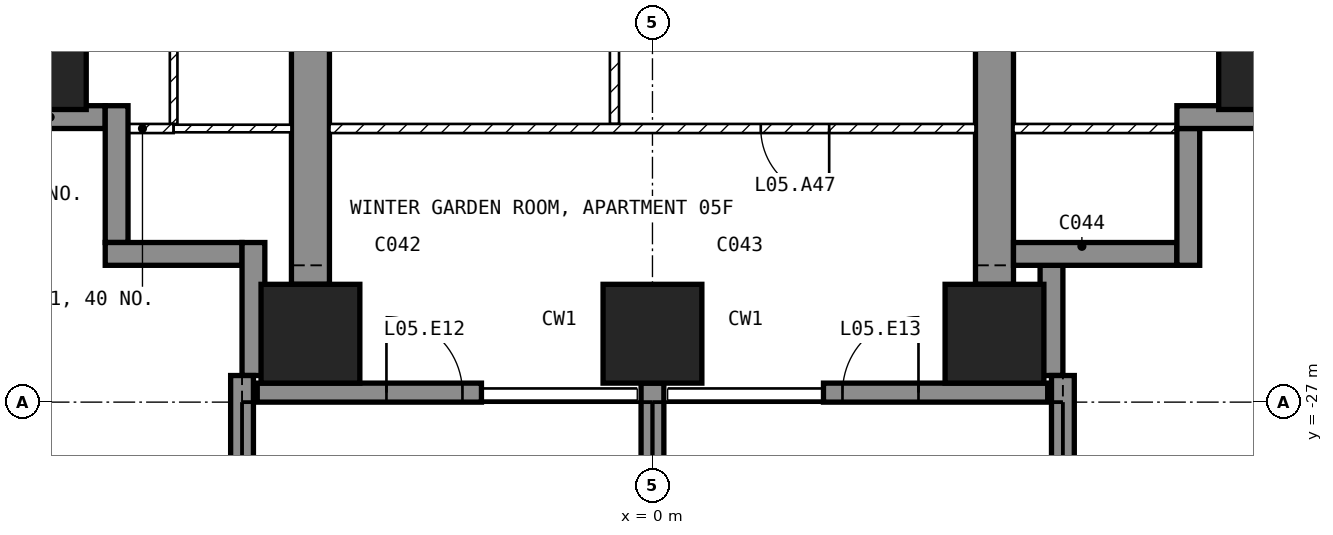
"""IFC4 building model, lengths in metres.
Left out: names, types, materials, properties, quantities, classifications, styles, units other than length and angle.
Written with IfcOpenShell. Run it as: python <this file> out.ifc"""

import sys

from ifc_helpers import new_model, si_unit, direction, frame, frame_2d, origin, origin_2d, place, context, subcontext, project, spatial, polyline, rectangle, outline, extrude, element, fill, save


model = new_model("IFC4")
c1 = context("Model", 3, precision=1e-05, world=origin(), true_north=direction((0.0, 1.0)))
c2 = subcontext(c1, "Body", "Model", "MODEL_VIEW")
j1 = project(units=[si_unit("LENGTHUNIT", "METRE"), si_unit("PLANEANGLEUNIT", "RADIAN")], contexts=[c1])
p1 = place(None, origin())
s1 = spatial("IfcSite", under=j1, at=p1, CompositionType="ELEMENT")
p2 = place(p1, origin())
s2 = spatial("IfcBuilding", under=s1, at=p2, CompositionType="ELEMENT")
p3 = place(p2, frame((0.0, 0.0, 36.5)))
s3 = spatial("IfcBuildingStorey", under=s2, at=p3, CompositionType="ELEMENT", Elevation=36.5)
for number, where, z_axis, x_axis in (
    (1, (-8.1, -22.5, -0.25), (0.0, 0.0, 1.0), (1.0, 0.0, 0.0)),
    (2, (-4.5, -26.1, -0.25), (0.0, 0.0, 1.0), (1.0, 0.0, 0.0)),
    (3, (0.0, -26.1, -0.25), (0.0, 0.0, 1.0), (1.0, 0.0, 0.0)),
    (4, (4.5, -26.1, -0.25), (0.0, 0.0, 1.0), (1.0, 0.0, 0.0)),
    (5, (8.1, -22.5, -0.25), (0.0, 0.0, 1.0), (1.0, 0.0, 0.0)),
):
    element("IfcColumn", number, at=place(p3, frame(where, z_axis=z_axis, x_axis=x_axis)), inside=s3, PredefinedType="COLUMN", context=c2, shape_type="SweptSolid", body=[
        extrude(rectangle(XDim=1.3, YDim=1.3, at=origin_2d()), origin(), (0.0, 0.0, 1.0), 3.5),
    ])
for number, where, z_axis, x_axis in (
    (6, (-4.75, -25.45, -0.25), (1.0, 0.0, 0.0), (0.0, 1.0, 0.0)),
    (7, (4.25, -25.45, -0.25), (1.0, 0.0, 0.0), (0.0, 1.0, 0.0)),
):
    element("IfcWall", number, at=place(p3, frame(where, z_axis=z_axis, x_axis=x_axis)), inside=s3, PredefinedType="SHEAR", context=c2, shape_type="SweptSolid", body=[
        extrude(outline(polyline([(0.0, 0.0), (4.15, 0.0), (4.15, 2.65), (6.55, 2.65), (6.55, 0.0), (11.95, 0.0), (11.95, 2.65), (14.35, 2.65), (14.35, 0.0), (16.45, 0.0), (16.45, 3.5), (0.0, 3.5), (0.0, 0.0)])), origin(), (0.0, 0.0, 1.0), 0.5),
    ])
p4 = place(p3, frame((-5.2, -26.875, 0.0), z_axis=(0.0, 0.0, 1.0), x_axis=(1.0, 0.0, 0.0)))
e8 = element("IfcWall", 8, at=p4, inside=s3, PredefinedType="SOLIDWALL", context=c2, shape_type="SweptSolid", body=[
    extrude(rectangle(XDim=2.95, YDim=0.25, at=frame_2d((1.475, 0.0))), origin(), (0.0, 0.0, 1.0), 3.25),
])
p5 = place(p4, frame((1.7, 0.0, 0.0)))
e9 = element("IfcOpeningElement", 9, at=p5, cuts=e8, PredefinedType="OPENING", context=c2, shape_type="SweptSolid", body=[
    extrude(rectangle(XDim=1.0, YDim=2.4, at=frame_2d((0.5, 1.2))), frame((0.0, 0.135, 0.0), z_axis=(0.0, -1.0, 0.0), x_axis=(1.0, 0.0, 0.0)), (0.0, 0.0, 1.0), 0.27),
])
p6 = place(p3, frame((2.25, -26.875, 0.0), z_axis=(0.0, 0.0, 1.0), x_axis=(1.0, 0.0, 0.0)))
e10 = element("IfcWall", 10, at=p6, inside=s3, PredefinedType="SOLIDWALL", context=c2, shape_type="SweptSolid", body=[
    extrude(rectangle(XDim=2.95, YDim=0.25, at=frame_2d((1.475, 0.0))), origin(), (0.0, 0.0, 1.0), 3.25),
])
p7 = place(p6, frame((0.25, 0.0, 0.0)))
e11 = element("IfcOpeningElement", 11, at=p7, cuts=e10, PredefinedType="OPENING", context=c2, shape_type="SweptSolid", body=[
    extrude(rectangle(XDim=1.0, YDim=2.4, at=frame_2d((0.5, 1.2))), frame((0.0, 0.135, 0.0), z_axis=(0.0, -1.0, 0.0), x_axis=(1.0, 0.0, 0.0)), (0.0, 0.0, 1.0), 0.27),
])
p8 = place(p3, frame((5.25, -26.65, 0.0), z_axis=(0.0, 0.0, 1.0), x_axis=(0.0, 1.0, 0.0)))
e12 = element("IfcWall", 12, at=p8, inside=s3, PredefinedType="SOLIDWALL", context=c2, shape_type="SweptSolid", body=[
    extrude(rectangle(XDim=1.45, YDim=0.3, at=frame_2d((0.725, 0.0))), origin(), (0.0, 0.0, 1.0), 3.25),
])
p9 = place(p3, frame((4.75, -25.05, 0.0), z_axis=(0.0, 0.0, 1.0), x_axis=(1.0, 0.0, 0.0)))
e13 = element("IfcWall", 13, at=p9, inside=s3, PredefinedType="SOLIDWALL", context=c2, shape_type="SweptSolid", body=[
    extrude(rectangle(XDim=2.15, YDim=0.3, at=frame_2d((1.075, 0.0))), origin(), (0.0, 0.0, 1.0), 3.25),
])
p10 = place(p3, frame((7.05, -25.2, 0.0), z_axis=(0.0, 0.0, 1.0), x_axis=(0.0, 1.0, 0.0)))
e14 = element("IfcWall", 14, at=p10, inside=s3, PredefinedType="SOLIDWALL", context=c2, shape_type="SweptSolid", body=[
    extrude(rectangle(XDim=1.8, YDim=0.3, at=frame_2d((0.9, 0.0))), origin(), (0.0, 0.0, 1.0), 3.25),
])
p11 = place(p3, frame((6.9, -23.25, 0.0), z_axis=(0.0, 0.0, 1.0), x_axis=(1.0, 0.0, 0.0)))
e15 = element("IfcWall", 15, at=p11, inside=s3, PredefinedType="SOLIDWALL", context=c2, shape_type="SweptSolid", body=[
    extrude(rectangle(XDim=1.75, YDim=0.3, at=frame_2d((0.875, 0.0))), origin(), (0.0, 0.0, 1.0), 3.25),
])
p12 = place(p3, frame((-8.65, -23.25, 0.0), z_axis=(0.0, 0.0, 1.0), x_axis=(1.0, 0.0, 0.0)))
e16 = element("IfcWall", 16, at=p12, inside=s3, PredefinedType="SOLIDWALL", context=c2, shape_type="SweptSolid", body=[
    extrude(rectangle(XDim=1.45, YDim=0.3, at=frame_2d((0.725, 0.0))), origin(), (0.0, 0.0, 1.0), 3.25),
])
p13 = place(p3, frame((-7.05, -23.1, 0.0), z_axis=(0.0, 0.0, 1.0), x_axis=(0.0, -1.0, 0.0)))
e17 = element("IfcWall", 17, at=p13, inside=s3, PredefinedType="SOLIDWALL", context=c2, shape_type="SweptSolid", body=[
    extrude(rectangle(XDim=1.8, YDim=0.3, at=frame_2d((0.9, 0.0))), origin(), (0.0, 0.0, 1.0), 3.25),
])
p14 = place(p3, frame((-7.2, -25.05, 0.0), z_axis=(0.0, 0.0, 1.0), x_axis=(1.0, 0.0, 0.0)))
e18 = element("IfcWall", 18, at=p14, inside=s3, PredefinedType="SOLIDWALL", context=c2, shape_type="SweptSolid", body=[
    extrude(rectangle(XDim=1.8, YDim=0.3, at=frame_2d((0.9, 0.0))), origin(), (0.0, 0.0, 1.0), 3.25),
])
p15 = place(p3, frame((-5.25, -24.9, 0.0), z_axis=(0.0, 0.0, 1.0), x_axis=(0.0, -1.0, 0.0)))
e19 = element("IfcWall", 19, at=p15, inside=s3, PredefinedType="SOLIDWALL", context=c2, shape_type="SweptSolid", body=[
    extrude(rectangle(XDim=1.75, YDim=0.3, at=frame_2d((0.875, 0.0))), origin(), (0.0, 0.0, 1.0), 3.25),
])
p16 = place(p3, frame((-5.4, -26.65, 0.0), z_axis=(0.0, 0.0, 1.0), x_axis=(0.0, -1.0, 0.0)))
e20 = element("IfcWall", 20, at=p16, inside=s3, PredefinedType="SOLIDWALL", context=c2, shape_type="SweptSolid", body=[
    extrude(rectangle(XDim=3.05, YDim=0.3, at=frame_2d((1.525, 0.0))), origin(), (0.0, 0.0, 1.0), 3.25),
])
p17 = place(p3, frame((0.0, -26.75, 0.0), z_axis=(0.0, 0.0, 1.0), x_axis=(0.0, -1.0, 0.0)))
e21 = element("IfcWall", 21, at=p17, inside=s3, PredefinedType="SOLIDWALL", context=c2, shape_type="SweptSolid", body=[
    extrude(rectangle(XDim=2.95, YDim=0.3, at=frame_2d((1.475, 0.0))), origin(), (0.0, 0.0, 1.0), 3.25),
])
p18 = place(p3, frame((5.4, -26.65, 0.0), z_axis=(0.0, 0.0, 1.0), x_axis=(0.0, -1.0, 0.0)))
e22 = element("IfcWall", 22, at=p18, inside=s3, PredefinedType="SOLIDWALL", context=c2, shape_type="SweptSolid", body=[
    extrude(rectangle(XDim=3.05, YDim=0.3, at=frame_2d((1.525, 0.0))), origin(), (0.0, 0.0, 1.0), 3.25),
])
p19 = place(p3, frame((-0.5, -23.34, 0.0), z_axis=(0.0, 0.0, 1.0), x_axis=(0.0, 1.0, 0.0)))
e23 = element("IfcWall", 23, at=p19, inside=s3, PredefinedType="PARTITIONING", context=c2, shape_type="SweptSolid", body=[
    extrude(rectangle(XDim=4.38, YDim=0.12, at=frame_2d((2.19, 0.0))), origin(), (0.0, 0.0, 1.0), 3.25),
])
p20 = place(p19, frame((1.74, 0.0, 0.0)))
e24 = element("IfcOpeningElement", 24, at=p20, cuts=e23, PredefinedType="OPENING", context=c2, shape_type="SweptSolid", body=[
    extrude(rectangle(XDim=0.9, YDim=2.1, at=frame_2d((0.45, 1.05))), frame((0.0, 0.07, 0.0), z_axis=(0.0, -1.0, 0.0), x_axis=(1.0, 0.0, 0.0)), (0.0, 0.0, 1.0), 0.14),
])
p21 = place(p3, frame((4.25, -23.4, 0.0), z_axis=(0.0, 0.0, 1.0), x_axis=(-1.0, 0.0, 0.0)))
e25 = element("IfcWall", 25, at=p21, inside=s3, PredefinedType="PARTITIONING", context=c2, shape_type="SweptSolid", body=[
    extrude(rectangle(XDim=8.5, YDim=0.12, at=frame_2d((4.25, 0.0))), origin(), (0.0, 0.0, 1.0), 3.25),
])
p22 = place(p21, frame((1.925, 0.0, 0.0)))
e26 = element("IfcOpeningElement", 26, at=p22, cuts=e25, PredefinedType="OPENING", context=c2, shape_type="SweptSolid", body=[
    extrude(rectangle(XDim=0.9, YDim=2.1, at=frame_2d((0.45, 1.05))), frame((0.0, 0.07, 0.0), z_axis=(0.0, -1.0, 0.0), x_axis=(1.0, 0.0, 0.0)), (0.0, 0.0, 1.0), 0.14),
])
p23 = place(p3, frame((7.12, -23.4, 0.0), z_axis=(0.0, 0.0, 1.0), x_axis=(-1.0, 0.0, 0.0)))
e27 = element("IfcWall", 27, at=p23, inside=s3, PredefinedType="PARTITIONING", context=c2, shape_type="SweptSolid", body=[
    extrude(rectangle(XDim=2.37, YDim=0.12, at=frame_2d((1.185, 0.0))), origin(), (0.0, 0.0, 1.0), 3.25),
])
p24 = place(p3, frame((-6.3, -20.45, 0.0), z_axis=(0.0, 0.0, 1.0), x_axis=(0.0, -1.0, 0.0)))
e28 = element("IfcWall", 28, at=p24, inside=s3, PredefinedType="PARTITIONING", context=c2, shape_type="SweptSolid", body=[
    extrude(rectangle(XDim=2.89, YDim=0.1, at=frame_2d((1.445, 0.0))), origin(), (0.0, 0.0, 1.0), 3.25),
])
p25 = place(p3, frame((-6.3, -23.4, 0.0), z_axis=(0.0, 0.0, 1.0), x_axis=(-1.0, 0.0, 0.0)))
e29 = element("IfcWall", 29, at=p25, inside=s3, PredefinedType="PARTITIONING", context=c2, shape_type="SweptSolid", body=[
    extrude(rectangle(XDim=0.82, YDim=0.12, at=frame_2d((0.41, 0.0))), origin(), (0.0, 0.0, 1.0), 3.25),
])
p26 = place(p3, frame((-4.75, -23.4, 0.0), z_axis=(0.0, 0.0, 1.0), x_axis=(-1.0, 0.0, 0.0)))
e30 = element("IfcWall", 30, at=p26, inside=s3, PredefinedType="PARTITIONING", context=c2, shape_type="SweptSolid", body=[
    extrude(rectangle(XDim=1.55, YDim=0.1, at=frame_2d((0.775, 0.0))), origin(), (0.0, 0.0, 1.0), 3.25),
])
p27 = place(p5, origin())
e31 = element("IfcDoor", 31, at=p27, inside=s3, OperationType="SINGLE_SWING_LEFT", PredefinedType="DOOR", context=c2, shape_type="SweptSolid", body=[
    extrude(rectangle(XDim=1.0, YDim=2.4, at=frame_2d((0.5, 1.2))), frame((0.0, 0.025, 0.0), z_axis=(0.0, -1.0, 0.0), x_axis=(1.0, 0.0, 0.0)), (0.0, 0.0, 1.0), 0.05),
])
fill(e9, e31)
p28 = place(p7, origin())
e32 = element("IfcDoor", 32, at=p28, inside=s3, OperationType="SINGLE_SWING_RIGHT", PredefinedType="DOOR", context=c2, shape_type="SweptSolid", body=[
    extrude(rectangle(XDim=1.0, YDim=2.4, at=frame_2d((0.5, 1.2))), frame((0.0, 0.025, 0.0), z_axis=(0.0, -1.0, 0.0), x_axis=(1.0, 0.0, 0.0)), (0.0, 0.0, 1.0), 0.05),
])
fill(e11, e32)
p29 = place(p22, origin())
e33 = element("IfcDoor", 33, at=p29, inside=s3, OperationType="SINGLE_SWING_LEFT", PredefinedType="DOOR", context=c2, shape_type="SweptSolid", body=[
    extrude(rectangle(XDim=0.9, YDim=2.1, at=frame_2d((0.45, 1.05))), frame((0.0, 0.025, 0.0), z_axis=(0.0, -1.0, 0.0), x_axis=(1.0, 0.0, 0.0)), (0.0, 0.0, 1.0), 0.05),
])
fill(e26, e33)
save(model, sys.argv[1])
